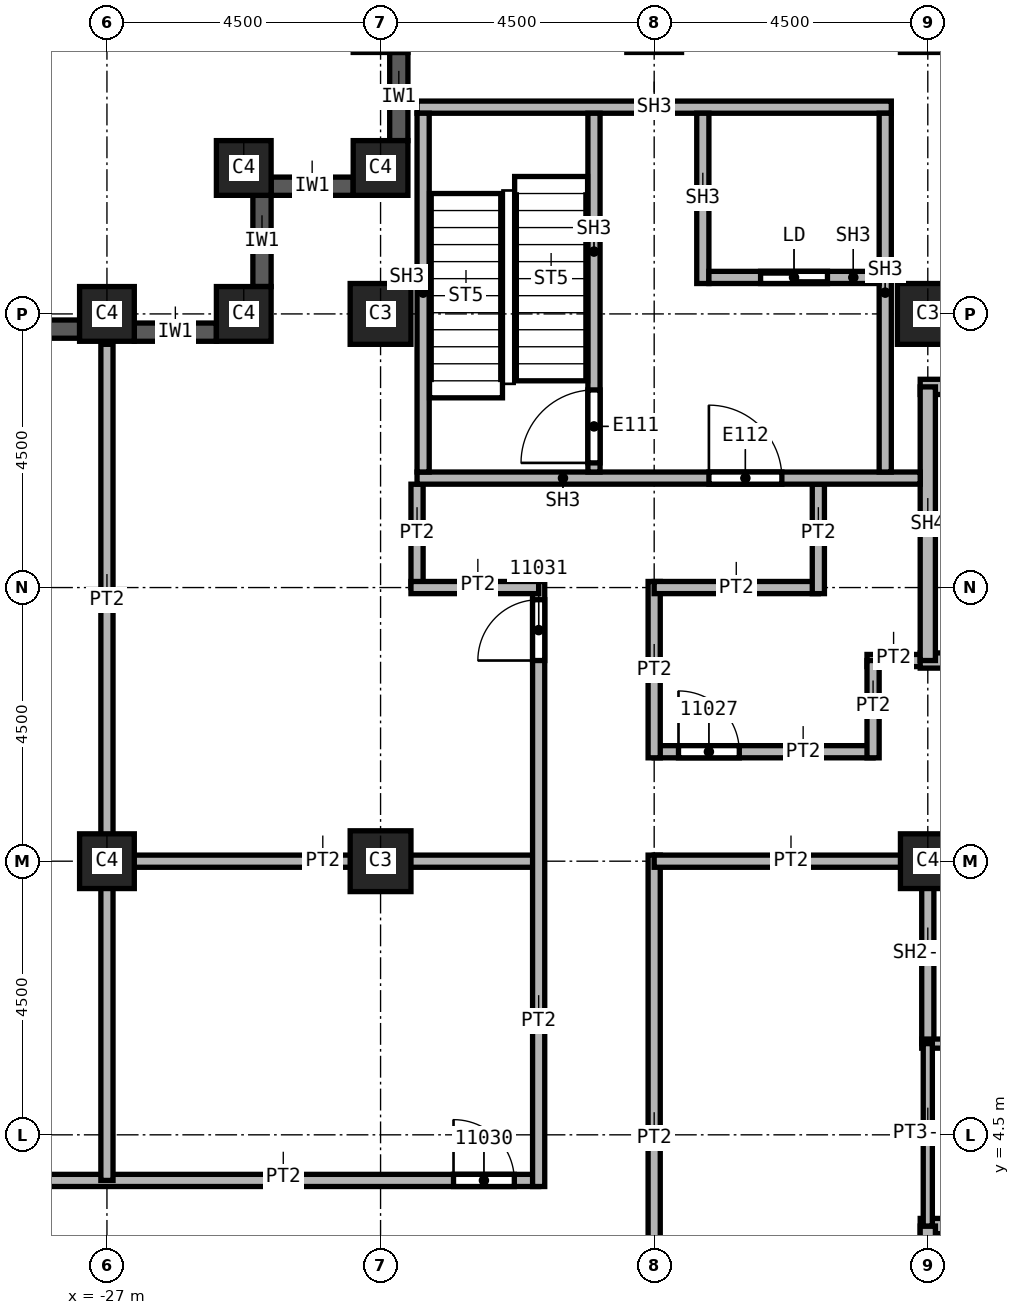
"""IFC4 building model, lengths in metres.
Left out: names, types, materials, properties, quantities, classifications, styles, units other than length and angle.
Written with IfcOpenShell. Run it as: python <this file> out.ifc"""

import sys

from ifc_helpers import new_model, si_unit, direction, frame, frame_2d, origin, origin_2d, place, context, subcontext, project, spatial, rectangle, extrude, element, fill, save


model = new_model("IFC4")
c1 = context("Model", 3, precision=1e-05, world=origin(), true_north=direction((0.0, 1.0)))
c2 = subcontext(c1, "Body", "Model", "MODEL_VIEW")
j1 = project(units=[si_unit("LENGTHUNIT", "METRE"), si_unit("PLANEANGLEUNIT", "RADIAN")], contexts=[c1])
p1 = place(None, origin())
s1 = spatial("IfcSite", under=j1, at=p1, CompositionType="ELEMENT")
p2 = place(p1, origin())
s2 = spatial("IfcBuilding", under=s1, at=p2, CompositionType="ELEMENT")
p3 = place(p2, frame((0.0, 0.0, 184.0)))
s3 = spatial("IfcBuildingStorey", under=s2, at=p3, CompositionType="ELEMENT", Elevation=184.0)
for number, where, z_axis, x_axis in (
    (1, (-13.5, 18.0, 0.0), (0.0, 0.0, 1.0), (1.0, 0.0, 0.0)),
    (2, (-22.5, 9.0, 0.0), (0.0, 0.0, 1.0), (1.0, 0.0, 0.0)),
    (3, (-22.5, 18.0, 0.0), (0.0, 0.0, 1.0), (1.0, 0.0, 0.0)),
):
    element("IfcColumn", number, at=place(p3, frame(where, z_axis=z_axis, x_axis=x_axis)), inside=s3, PredefinedType="COLUMN", context=c2, shape_type="SweptSolid", body=[
        extrude(rectangle(XDim=1.0, YDim=1.0, at=origin_2d()), origin(), (0.0, 0.0, 1.0), 3.72),
    ])
for number, where, z_axis, x_axis in (
    (4, (-13.5, 9.0, 0.0), (0.0, 0.0, 1.0), (1.0, 0.0, 0.0)),
    (5, (-27.0, 9.0, 0.0), (0.0, 0.0, 1.0), (1.0, 0.0, 0.0)),
    (6, (-27.0, 18.0, 0.0), (0.0, 0.0, 1.0), (1.0, 0.0, 0.0)),
    (7, (-22.5, 20.4, 0.0), (0.0, 0.0, 1.0), (1.0, 0.0, 0.0)),
    (8, (-24.75, 20.4, 0.0), (0.0, 0.0, 1.0), (1.0, 0.0, 0.0)),
    (9, (-24.75, 18.0, 0.0), (0.0, 0.0, 1.0), (1.0, 0.0, 0.0)),
):
    element("IfcColumn", number, at=place(p3, frame(where, z_axis=z_axis, x_axis=x_axis)), inside=s3, PredefinedType="COLUMN", context=c2, shape_type="SweptSolid", body=[
        extrude(rectangle(XDim=0.9, YDim=0.9, at=origin_2d()), origin(), (0.0, 0.0, 1.0), 3.72),
    ])
p4 = place(p3, frame((-22.95, 20.1, 0.0), z_axis=(0.0, 0.0, 1.0), x_axis=(-1.0, 0.0, 0.0)))
e10 = element("IfcWall", 10, at=p4, inside=s3, PredefinedType="SOLIDWALL", context=c2, shape_type="SweptSolid", body=[
    extrude(rectangle(XDim=1.35, YDim=0.3, at=frame_2d((0.675, 0.0))), origin(), (0.0, 0.0, 1.0), 3.12),
])
p5 = place(p3, frame((-24.45, 19.95, 0.0), z_axis=(0.0, 0.0, 1.0), x_axis=(0.0, -1.0, 0.0)))
e11 = element("IfcWall", 11, at=p5, inside=s3, PredefinedType="SOLIDWALL", context=c2, shape_type="SweptSolid", body=[
    extrude(rectangle(XDim=1.5, YDim=0.3, at=frame_2d((0.75, 0.0))), origin(), (0.0, 0.0, 1.0), 3.12),
])
p6 = place(p3, frame((-25.2, 17.7, 0.0), z_axis=(0.0, 0.0, 1.0), x_axis=(-1.0, 0.0, 0.0)))
e12 = element("IfcWall", 12, at=p6, inside=s3, PredefinedType="SOLIDWALL", context=c2, shape_type="SweptSolid", body=[
    extrude(rectangle(XDim=1.35, YDim=0.3, at=frame_2d((0.675, 0.0))), origin(), (0.0, 0.0, 1.0), 3.12),
])
p7 = place(p3, frame((-27.45, 17.75, 0.0), z_axis=(0.0, 0.0, 1.0), x_axis=(-1.0, 0.0, 0.0)))
e13 = element("IfcWall", 13, at=p7, inside=s3, PredefinedType="SOLIDWALL", context=c2, shape_type="SweptSolid", body=[
    extrude(rectangle(XDim=3.6, YDim=0.3, at=frame_2d((1.8, 0.0))), origin(), (0.0, 0.0, 1.0), 3.12),
])
p8 = place(p7, frame((0.6, 0.0, 0.8)))
e14 = element("IfcOpeningElement", 14, at=p8, cuts=e13, PredefinedType="OPENING", context=c2, shape_type="SweptSolid", body=[
    extrude(rectangle(XDim=2.4, YDim=1.95, at=frame_2d((1.2, 0.975))), frame((0.0, 0.15, 0.0), z_axis=(0.0, -1.0, 0.0), x_axis=(1.0, 0.0, 0.0)), (0.0, 0.0, 1.0), 0.3),
])
p9 = place(p3, frame((-22.2, 22.3, 0.0), z_axis=(0.0, 0.0, 1.0), x_axis=(0.0, -1.0, 0.0)))
e15 = element("IfcWall", 15, at=p9, inside=s3, PredefinedType="SOLIDWALL", context=c2, shape_type="SweptSolid", body=[
    extrude(rectangle(XDim=1.45, YDim=0.3, at=frame_2d((0.725, 0.0))), origin(), (0.0, 0.0, 1.0), 3.12),
])
p10 = place(p3, frame((-33.85, 3.75, 0.0), z_axis=(0.0, 0.0, 1.0), x_axis=(1.0, 0.0, 0.0)))
e16 = element("IfcWall", 16, at=p10, inside=s3, PredefinedType="PARTITIONING", context=c2, shape_type="SweptSolid", body=[
    extrude(rectangle(XDim=13.95, YDim=0.2, at=frame_2d((6.975, 0.0))), origin(), (0.0, 0.0, 1.0), 3.72),
])
p11 = place(p10, frame((12.55, 0.0, 0.0)))
e17 = element("IfcOpeningElement", 17, at=p11, cuts=e16, PredefinedType="OPENING", context=c2, shape_type="SweptSolid", body=[
    extrude(rectangle(XDim=1.0, YDim=2.1, at=frame_2d((0.5, 1.05))), frame((0.0, 0.1, 0.0), z_axis=(0.0, -1.0, 0.0), x_axis=(1.0, 0.0, 0.0)), (0.0, 0.0, 1.0), 0.2),
])
p12 = place(p10, frame((3.25, 0.0, 0.0)))
e18 = element("IfcOpeningElement", 18, at=p12, cuts=e16, PredefinedType="OPENING", context=c2, shape_type="SweptSolid", body=[
    extrude(rectangle(XDim=1.0, YDim=2.1, at=frame_2d((0.5, 1.05))), frame((0.0, 0.1, 0.0), z_axis=(0.0, -1.0, 0.0), x_axis=(1.0, 0.0, 0.0)), (0.0, 0.0, 1.0), 0.2),
])
p13 = place(p3, frame((-27.1, 9.0, 0.0), z_axis=(0.0, 0.0, 1.0), x_axis=(1.0, 0.0, 0.0)))
e19 = element("IfcWall", 19, at=p13, inside=s3, PredefinedType="PARTITIONING", context=c2, shape_type="SweptSolid", body=[
    extrude(rectangle(XDim=7.2, YDim=0.2, at=frame_2d((3.6, 0.0))), origin(), (0.0, 0.0, 1.0), 3.72),
])
p14 = place(p3, frame((-27.0, 3.75, 0.0), z_axis=(0.0, 0.0, 1.0), x_axis=(0.0, 1.0, 0.0)))
e20 = element("IfcWall", 20, at=p14, inside=s3, PredefinedType="PARTITIONING", context=c2, shape_type="SweptSolid", body=[
    extrude(rectangle(XDim=13.75, YDim=0.2, at=frame_2d((6.875, 0.0))), origin(), (0.0, 0.0, 1.0), 3.72),
])
p15 = place(p3, frame((-21.9, 13.5, 0.0), z_axis=(0.0, 0.0, 1.0), x_axis=(0.0, 1.0, 0.0)))
e21 = element("IfcWall", 21, at=p15, inside=s3, PredefinedType="PARTITIONING", context=c2, shape_type="SweptSolid", body=[
    extrude(rectangle(XDim=1.7, YDim=0.2, at=frame_2d((0.85, 0.0))), origin(), (0.0, 0.0, 1.0), 3.72),
])
p16 = place(p3, frame((-19.9, 3.65, 0.0), z_axis=(0.0, 0.0, 1.0), x_axis=(0.0, 1.0, 0.0)))
e22 = element("IfcWall", 22, at=p16, inside=s3, PredefinedType="PARTITIONING", context=c2, shape_type="SweptSolid", body=[
    extrude(rectangle(XDim=9.95, YDim=0.2, at=frame_2d((4.975, 0.0))), origin(), (0.0, 0.0, 1.0), 3.72),
])
p17 = place(p16, frame((8.65, 0.0, 0.0)))
e23 = element("IfcOpeningElement", 23, at=p17, cuts=e22, PredefinedType="OPENING", context=c2, shape_type="SweptSolid", body=[
    extrude(rectangle(XDim=1.0, YDim=2.1, at=frame_2d((0.5, 1.05))), frame((0.0, 0.1, 0.0), z_axis=(0.0, -1.0, 0.0), x_axis=(1.0, 0.0, 0.0)), (0.0, 0.0, 1.0), 0.2),
])
p18 = place(p3, frame((-19.9, 13.5, 0.0), z_axis=(0.0, 0.0, 1.0), x_axis=(-1.0, 0.0, 0.0)))
e24 = element("IfcWall", 24, at=p18, inside=s3, PredefinedType="PARTITIONING", context=c2, shape_type="SweptSolid", body=[
    extrude(rectangle(XDim=2.1, YDim=0.2, at=frame_2d((1.05, 0.0))), origin(), (0.0, 0.0, 1.0), 3.72),
])
p19 = place(p3, frame((-18.0, 9.1, 0.0), z_axis=(0.0, 0.0, 1.0), x_axis=(0.0, -1.0, 0.0)))
e25 = element("IfcWall", 25, at=p19, inside=s3, PredefinedType="PARTITIONING", context=c2, shape_type="SweptSolid", body=[
    extrude(rectangle(XDim=18.2, YDim=0.2, at=frame_2d((9.1, 0.0))), origin(), (0.0, 0.0, 1.0), 3.72),
])
p20 = place(p19, frame((13.75, 0.0, 0.0)))
e26 = element("IfcOpeningElement", 26, at=p20, cuts=e25, PredefinedType="OPENING", context=c2, shape_type="SweptSolid", body=[
    extrude(rectangle(XDim=1.0, YDim=2.1, at=frame_2d((0.5, 1.05))), frame((0.0, 0.1, 0.0), z_axis=(0.0, -1.0, 0.0), x_axis=(1.0, 0.0, 0.0)), (0.0, 0.0, 1.0), 0.2),
])
p21 = place(p19, frame((9.1, 0.0, 0.0)))
e27 = element("IfcOpeningElement", 27, at=p21, cuts=e25, PredefinedType="OPENING", context=c2, shape_type="SweptSolid", body=[
    extrude(rectangle(XDim=1.0, YDim=2.1, at=frame_2d((0.5, 1.05))), frame((0.0, 0.1, 0.0), z_axis=(0.0, -1.0, 0.0), x_axis=(1.0, 0.0, 0.0)), (0.0, 0.0, 1.0), 0.2),
])
p22 = place(p3, frame((-18.0, 10.8, 0.0), z_axis=(0.0, 0.0, 1.0), x_axis=(1.0, 0.0, 0.0)))
e28 = element("IfcWall", 28, at=p22, inside=s3, PredefinedType="PARTITIONING", context=c2, shape_type="SweptSolid", body=[
    extrude(rectangle(XDim=3.6, YDim=0.2, at=frame_2d((1.8, 0.0))), origin(), (0.0, 0.0, 1.0), 3.72),
])
p23 = place(p22, frame((0.4, 0.0, 0.0)))
e29 = element("IfcOpeningElement", 29, at=p23, cuts=e28, PredefinedType="OPENING", context=c2, shape_type="SweptSolid", body=[
    extrude(rectangle(XDim=1.0, YDim=2.1, at=frame_2d((0.5, 1.05))), frame((0.0, 0.1, 0.0), z_axis=(0.0, -1.0, 0.0), x_axis=(1.0, 0.0, 0.0)), (0.0, 0.0, 1.0), 0.2),
])
p24 = place(p3, frame((-18.0, 13.6, 0.0), z_axis=(0.0, 0.0, 1.0), x_axis=(0.0, -1.0, 0.0)))
e30 = element("IfcWall", 30, at=p24, inside=s3, PredefinedType="PARTITIONING", context=c2, shape_type="SweptSolid", body=[
    extrude(rectangle(XDim=2.9, YDim=0.2, at=frame_2d((1.45, 0.0))), origin(), (0.0, 0.0, 1.0), 3.72),
])
p25 = place(p3, frame((-15.3, 13.5, 0.0), z_axis=(0.0, 0.0, 1.0), x_axis=(-1.0, 0.0, 0.0)))
e31 = element("IfcWall", 31, at=p25, inside=s3, PredefinedType="PARTITIONING", context=c2, shape_type="SweptSolid", body=[
    extrude(rectangle(XDim=2.7, YDim=0.2, at=frame_2d((1.35, 0.0))), origin(), (0.0, 0.0, 1.0), 3.72),
])
p26 = place(p3, frame((-15.3, 15.2, 0.0), z_axis=(0.0, 0.0, 1.0), x_axis=(0.0, -1.0, 0.0)))
e32 = element("IfcWall", 32, at=p26, inside=s3, PredefinedType="PARTITIONING", context=c2, shape_type="SweptSolid", body=[
    extrude(rectangle(XDim=1.8, YDim=0.2, at=frame_2d((0.9, 0.0))), origin(), (0.0, 0.0, 1.0), 3.72),
])
p27 = place(p3, frame((-14.5, 12.3, 0.0), z_axis=(0.0, 0.0, 1.0), x_axis=(1.0, 0.0, 0.0)))
e33 = element("IfcWall", 33, at=p27, inside=s3, PredefinedType="PARTITIONING", context=c2, shape_type="SweptSolid", body=[
    extrude(rectangle(XDim=1.125, YDim=0.2, at=frame_2d((0.562, 0.0))), origin(), (0.0, 0.0, 1.0), 3.72),
])
p28 = place(p3, frame((-13.5, 9.0, 0.0), z_axis=(0.0, 0.0, 1.0), x_axis=(-1.0, 0.0, 0.0)))
e34 = element("IfcWall", 34, at=p28, inside=s3, PredefinedType="PARTITIONING", context=c2, shape_type="SweptSolid", body=[
    extrude(rectangle(XDim=4.5, YDim=0.2, at=frame_2d((2.25, 0.0))), origin(), (0.0, 0.0, 1.0), 3.72),
])
p29 = place(p3, frame((-14.4, 10.7, 0.0), z_axis=(0.0, 0.0, 1.0), x_axis=(0.0, 1.0, 0.0)))
e35 = element("IfcWall", 35, at=p29, inside=s3, PredefinedType="PARTITIONING", context=c2, shape_type="SweptSolid", body=[
    extrude(rectangle(XDim=1.6, YDim=0.2, at=frame_2d((0.8, 0.0))), origin(), (0.0, 0.0, 1.0), 3.72),
])
for number, where, z_axis, x_axis in (
    (36, (-13.6, 9.0, 0.0), (0.0, 0.0, 1.0), (1.0, 0.0, 0.0)),
    (37, (-13.5, 6.0, 0.0), (0.0, 0.0, 1.0), (0.0, 1.0, 0.0)),
):
    element("IfcWall", number, at=place(p3, frame(where, z_axis=z_axis, x_axis=x_axis)), inside=s3, PredefinedType="SOLIDWALL", context=c2, shape_type="SweptSolid", body=[
        extrude(rectangle(XDim=3.1, YDim=0.2, at=frame_2d((1.55, 0.0))), origin(), (0.0, 0.0, 1.0), 2.958),
    ])
p30 = place(p3, frame((-13.625, 3.0, 0.0), z_axis=(0.0, 0.0, 1.0), x_axis=(1.0, 0.0, 0.0)))
e38 = element("IfcWall", 38, at=p30, inside=s3, PredefinedType="SOLIDWALL", context=c2, shape_type="SweptSolid", body=[
    extrude(rectangle(XDim=9.25, YDim=0.25, at=frame_2d((4.625, 0.0))), origin(), (0.0, 0.0, 1.0), 3.72),
])
p31 = place(p30, frame((3.25, 0.0, 0.0)))
e39 = element("IfcOpeningElement", 39, at=p31, cuts=e38, PredefinedType="OPENING", context=c2, shape_type="SweptSolid", body=[
    extrude(rectangle(XDim=1.1, YDim=2.1, at=frame_2d((0.55, 1.05))), frame((0.0, 0.125, 0.0), z_axis=(0.0, -1.0, 0.0), x_axis=(1.0, 0.0, 0.0)), (0.0, 0.0, 1.0), 0.25),
])
p32 = place(p3, frame((-13.5, -3.0, 0.0), z_axis=(0.0, 0.0, 1.0), x_axis=(0.0, 1.0, 0.0)))
e40 = element("IfcWall", 40, at=p32, inside=s3, PredefinedType="SOLIDWALL", context=c2, shape_type="SweptSolid", body=[
    extrude(rectangle(XDim=6.0, YDim=0.25, at=frame_2d((3.0, 0.0))), origin(), (0.0, 0.0, 1.0), 2.958),
])
p33 = place(p3, frame((-13.625, 12.3, 0.0), z_axis=(0.0, 0.0, 1.0), x_axis=(1.0, 0.0, 0.0)))
e41 = element("IfcWall", 41, at=p33, inside=s3, PredefinedType="SOLIDWALL", context=c2, shape_type="SweptSolid", body=[
    extrude(rectangle(XDim=9.25, YDim=0.25, at=frame_2d((4.625, 0.0))), origin(), (0.0, 0.0, 1.0), 3.72),
])
p34 = place(p33, frame((0.85, 0.0, 0.0)))
e42 = element("IfcOpeningElement", 42, at=p34, cuts=e41, PredefinedType="OPENING", context=c2, shape_type="SweptSolid", body=[
    extrude(rectangle(XDim=1.2, YDim=2.1, at=frame_2d((0.6, 1.05))), frame((0.0, 0.125, 0.0), z_axis=(0.0, -1.0, 0.0), x_axis=(1.0, 0.0, 0.0)), (0.0, 0.0, 1.0), 0.25),
])
p35 = place(p3, frame((-13.625, 16.8, 0.0), z_axis=(0.0, 0.0, 1.0), x_axis=(1.0, 0.0, 0.0)))
e43 = element("IfcWall", 43, at=p35, inside=s3, PredefinedType="SOLIDWALL", context=c2, shape_type="SweptSolid", body=[
    extrude(rectangle(XDim=9.25, YDim=0.25, at=frame_2d((4.625, 0.0))), origin(), (0.0, 0.0, 1.0), 3.72),
])
p36 = place(p3, frame((-13.5, 12.3, 0.0), z_axis=(0.0, 0.0, 1.0), x_axis=(0.0, 1.0, 0.0)))
e44 = element("IfcWall", 44, at=p36, inside=s3, PredefinedType="SOLIDWALL", context=c2, shape_type="SweptSolid", body=[
    extrude(rectangle(XDim=4.5, YDim=0.25, at=frame_2d((2.25, 0.0))), origin(), (0.0, 0.0, 1.0), 3.72),
])
p37 = place(p3, frame((-13.6, 6.0, 0.0), z_axis=(0.0, 0.0, 1.0), x_axis=(1.0, 0.0, 0.0)))
e45 = element("IfcWall", 45, at=p37, inside=s3, PredefinedType="PARTITIONING", context=c2, shape_type="SweptSolid", body=[
    extrude(rectangle(XDim=3.1, YDim=0.15, at=frame_2d((1.55, 0.0))), origin(), (0.0, 0.0, 1.0), 3.72),
])
p38 = place(p3, frame((-13.5, 3.0, 0.0), z_axis=(0.0, 0.0, 1.0), x_axis=(0.0, 1.0, 0.0)))
e46 = element("IfcWall", 46, at=p38, inside=s3, PredefinedType="PARTITIONING", context=c2, shape_type="SweptSolid", body=[
    extrude(rectangle(XDim=3.0, YDim=0.15, at=frame_2d((1.5, 0.0))), origin(), (0.0, 0.0, 1.0), 2.958),
])
p39 = place(p3, frame((-21.9, 15.3, 0.0), z_axis=(0.0, 0.0, 1.0), x_axis=(1.0, 0.0, 0.0)))
e47 = element("IfcWall", 47, at=p39, inside=s3, PredefinedType="SOLIDWALL", context=c2, shape_type="SweptSolid", body=[
    extrude(rectangle(XDim=8.275, YDim=0.2, at=frame_2d((4.137, 0.0))), origin(), (0.0, 0.0, 1.0), 3.72),
])
p40 = place(p39, frame((4.8, 0.0, 0.0)))
e48 = element("IfcOpeningElement", 48, at=p40, cuts=e47, PredefinedType="OPENING", context=c2, shape_type="SweptSolid", body=[
    extrude(rectangle(XDim=1.2, YDim=2.1, at=frame_2d((0.6, 1.05))), frame((0.0, 0.1, 0.0), z_axis=(0.0, -1.0, 0.0), x_axis=(1.0, 0.0, 0.0)), (0.0, 0.0, 1.0), 0.2),
])
p41 = place(p3, frame((-21.9, 21.4, 0.0), z_axis=(0.0, 0.0, 1.0), x_axis=(1.0, 0.0, 0.0)))
e49 = element("IfcWall", 49, at=p41, inside=s3, PredefinedType="SOLIDWALL", context=c2, shape_type="SweptSolid", body=[
    extrude(rectangle(XDim=7.8, YDim=0.2, at=frame_2d((3.9, 0.0))), origin(), (0.0, 0.0, 1.0), 3.72),
])
for number, where, z_axis, x_axis in (
    (50, (-21.8, 15.4, 0.0), (0.0, 0.0, 1.0), (0.0, 1.0, 0.0)),
    (51, (-14.2, 15.4, 0.0), (0.0, 0.0, 1.0), (0.0, 1.0, 0.0)),
):
    element("IfcWall", number, at=place(p3, frame(where, z_axis=z_axis, x_axis=x_axis)), inside=s3, PredefinedType="SOLIDWALL", context=c2, shape_type="SweptSolid", body=[
        extrude(rectangle(XDim=5.9, YDim=0.2, at=frame_2d((2.95, 0.0))), origin(), (0.0, 0.0, 1.0), 3.72),
    ])
p42 = place(p3, frame((-18.99, 15.4, 0.0), z_axis=(0.0, 0.0, 1.0), x_axis=(0.0, 1.0, 0.0)))
e52 = element("IfcWall", 52, at=p42, inside=s3, PredefinedType="SOLIDWALL", context=c2, shape_type="SweptSolid", body=[
    extrude(rectangle(XDim=5.9, YDim=0.2, at=frame_2d((2.95, 0.0))), origin(), (0.0, 0.0, 1.0), 3.72),
])
p43 = place(p42, frame((0.15, 0.0, 0.0)))
e53 = element("IfcOpeningElement", 53, at=p43, cuts=e52, PredefinedType="OPENING", context=c2, shape_type="SweptSolid", body=[
    extrude(rectangle(XDim=1.2, YDim=2.1, at=frame_2d((0.6, 1.05))), frame((0.0, 0.1, 0.0), z_axis=(0.0, -1.0, 0.0), x_axis=(1.0, 0.0, 0.0)), (0.0, 0.0, 1.0), 0.2),
])
p44 = place(p3, frame((-17.2, 18.5, 0.0), z_axis=(0.0, 0.0, 1.0), x_axis=(0.0, 1.0, 0.0)))
e54 = element("IfcWall", 54, at=p44, inside=s3, PredefinedType="SOLIDWALL", context=c2, shape_type="SweptSolid", body=[
    extrude(rectangle(XDim=2.8, YDim=0.2, at=frame_2d((1.4, 0.0))), origin(), (0.0, 0.0, 1.0), 3.72),
])
p45 = place(p3, frame((-17.1, 18.6, 0.0), z_axis=(0.0, 0.0, 1.0), x_axis=(1.0, 0.0, 0.0)))
e55 = element("IfcWall", 55, at=p45, inside=s3, PredefinedType="SOLIDWALL", context=c2, shape_type="SweptSolid", body=[
    extrude(rectangle(XDim=2.8, YDim=0.2, at=frame_2d((1.4, 0.0))), origin(), (0.0, 0.0, 1.0), 3.72),
])
p46 = place(p45, frame((0.85, 0.0, 0.0)))
e56 = element("IfcOpeningElement", 56, at=p46, cuts=e55, PredefinedType="OPENING", context=c2, shape_type="SweptSolid", body=[
    extrude(rectangle(XDim=1.1, YDim=2.1, at=frame_2d((0.55, 1.05))), frame((0.0, 0.1, 0.0), z_axis=(0.0, -1.0, 0.0), x_axis=(1.0, 0.0, 0.0)), (0.0, 0.0, 1.0), 0.2),
])
p47 = place(p23, origin())
e57 = element("IfcDoor", 57, at=p47, inside=s3, OperationType="SINGLE_SWING_RIGHT", PredefinedType="DOOR", context=c2, shape_type="SweptSolid", body=[
    extrude(rectangle(XDim=1.0, YDim=2.1, at=frame_2d((0.5, 1.05))), frame((0.0, 0.025, 0.0), z_axis=(0.0, -1.0, 0.0), x_axis=(1.0, 0.0, 0.0)), (0.0, 0.0, 1.0), 0.05),
])
fill(e29, e57)
p48 = place(p11, origin())
e58 = element("IfcDoor", 58, at=p48, inside=s3, OperationType="SINGLE_SWING_LEFT", PredefinedType="DOOR", context=c2, shape_type="SweptSolid", body=[
    extrude(rectangle(XDim=1.0, YDim=2.1, at=frame_2d((0.5, 1.05))), frame((0.0, 0.025, 0.0), z_axis=(0.0, -1.0, 0.0), x_axis=(1.0, 0.0, 0.0)), (0.0, 0.0, 1.0), 0.05),
])
fill(e17, e58)
p49 = place(p17, origin())
e59 = element("IfcDoor", 59, at=p49, inside=s3, OperationType="SINGLE_SWING_RIGHT", PredefinedType="DOOR", context=c2, shape_type="SweptSolid", body=[
    extrude(rectangle(XDim=1.0, YDim=2.1, at=frame_2d((0.5, 1.05))), frame((0.0, 0.025, 0.0), z_axis=(0.0, -1.0, 0.0), x_axis=(1.0, 0.0, 0.0)), (0.0, 0.0, 1.0), 0.05),
])
fill(e23, e59)
p50 = place(p43, origin())
e60 = element("IfcDoor", 60, at=p50, inside=s3, OperationType="SINGLE_SWING_LEFT", PredefinedType="DOOR", context=c2, shape_type="SweptSolid", body=[
    extrude(rectangle(XDim=1.2, YDim=2.1, at=frame_2d((0.6, 1.05))), frame((0.0, 0.025, 0.0), z_axis=(0.0, -1.0, 0.0), x_axis=(1.0, 0.0, 0.0)), (0.0, 0.0, 1.0), 0.05),
])
fill(e53, e60)
p51 = place(p46, origin())
e61 = element("IfcDoor", 61, at=p51, inside=s3, OperationType="SLIDING_TO_LEFT", PredefinedType="DOOR", context=c2, shape_type="SweptSolid", body=[
    extrude(rectangle(XDim=1.1, YDim=2.1, at=frame_2d((0.55, 1.05))), frame((0.0, 0.025, 0.0), z_axis=(0.0, -1.0, 0.0), x_axis=(1.0, 0.0, 0.0)), (0.0, 0.0, 1.0), 0.05),
])
fill(e56, e61)
p52 = place(p40, origin())
e62 = element("IfcDoor", 62, at=p52, inside=s3, OperationType="SINGLE_SWING_RIGHT", PredefinedType="DOOR", context=c2, shape_type="SweptSolid", body=[
    extrude(rectangle(XDim=1.2, YDim=2.1, at=frame_2d((0.6, 1.05))), frame((0.0, 0.025, 0.0), z_axis=(0.0, -1.0, 0.0), x_axis=(1.0, 0.0, 0.0)), (0.0, 0.0, 1.0), 0.05),
])
fill(e48, e62)
save(model, sys.argv[1])
